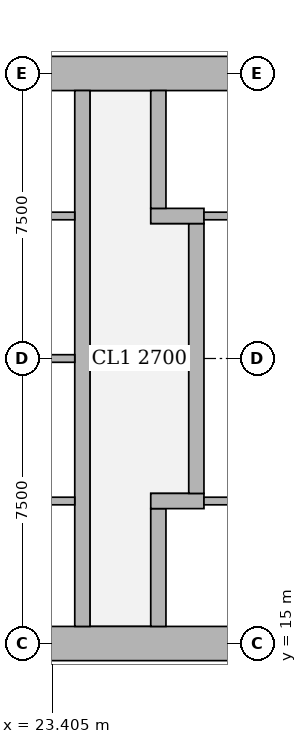
"""IFC4 building model, lengths in metres.
Left out: names, types, materials, properties, quantities, classifications, styles, units other than length and angle.
Written with IfcOpenShell. Run it as: python <this file> out.ifc"""

import sys

from ifc_helpers import new_model, si_unit, direction, frame, frame_2d, origin, place, context, subcontext, project, spatial, rectangle, extrude, element, fill, save


model = new_model("IFC4")
c1 = context("Model", 3, precision=1e-05, world=origin(), true_north=direction((0.0, 1.0)))
c2 = subcontext(c1, "Body", "Model", "MODEL_VIEW")
j1 = project(units=[si_unit("LENGTHUNIT", "METRE"), si_unit("PLANEANGLEUNIT", "RADIAN")], contexts=[c1])
p1 = place(None, origin())
s1 = spatial("IfcSite", under=j1, at=p1, CompositionType="ELEMENT")
p2 = place(p1, origin())
s2 = spatial("IfcBuilding", under=s1, at=p2, CompositionType="ELEMENT")
p3 = place(p2, frame((0.0, 0.0, 20.0)))
s3 = spatial("IfcBuildingStorey", under=s2, at=p3, CompositionType="ELEMENT", Elevation=20.0)
p4 = place(p3, frame((13.95, 15.0, 0.0), z_axis=(0.0, 0.0, 1.0), x_axis=(1.0, 0.0, 0.0)))
e1 = element("IfcWall", 1, at=p4, inside=s3, PredefinedType="SHEAR", context=c2, shape_type="SweptSolid", body=[
    extrude(rectangle(XDim=15.3, YDim=0.9, at=frame_2d((7.65, 0.0))), origin(), (0.0, 0.0, 1.0), 3.75),
])
p5 = place(p4, frame((4.45, 0.0, 0.0)))
e2 = element("IfcOpeningElement", 2, at=p5, cuts=e1, PredefinedType="OPENING", context=c2, shape_type="SweptSolid", body=[
    extrude(rectangle(XDim=1.8, YDim=2.1, at=frame_2d((0.9, 1.05))), frame((0.0, 0.46, 0.0), z_axis=(0.0, -1.0, 0.0), x_axis=(1.0, 0.0, 0.0)), (0.0, 0.0, 1.0), 0.92),
])
p6 = place(p4, frame((10.7, 0.0, 0.0)))
e3 = element("IfcOpeningElement", 3, at=p6, cuts=e1, PredefinedType="OPENING", context=c2, shape_type="SweptSolid", body=[
    extrude(rectangle(XDim=1.1, YDim=2.1, at=frame_2d((0.55, 1.05))), frame((0.0, 0.46, 0.0), z_axis=(0.0, -1.0, 0.0), x_axis=(1.0, 0.0, 0.0)), (0.0, 0.0, 1.0), 0.92),
])
p7 = place(p3, frame((13.95, 30.0, 0.0), z_axis=(0.0, 0.0, 1.0), x_axis=(1.0, 0.0, 0.0)))
e4 = element("IfcWall", 4, at=p7, inside=s3, PredefinedType="SHEAR", context=c2, shape_type="SweptSolid", body=[
    extrude(rectangle(XDim=15.3, YDim=0.9, at=frame_2d((7.65, 0.0))), origin(), (0.0, 0.0, 1.0), 3.75),
])
p8 = place(p7, frame((4.45, 0.0, 0.0)))
e5 = element("IfcOpeningElement", 5, at=p8, cuts=e4, PredefinedType="OPENING", context=c2, shape_type="SweptSolid", body=[
    extrude(rectangle(XDim=1.8, YDim=2.1, at=frame_2d((0.9, 1.05))), frame((0.0, 0.46, 0.0), z_axis=(0.0, -1.0, 0.0), x_axis=(1.0, 0.0, 0.0)), (0.0, 0.0, 1.0), 0.92),
])
p9 = place(p7, frame((10.7, 0.0, 0.0)))
e6 = element("IfcOpeningElement", 6, at=p9, cuts=e4, PredefinedType="OPENING", context=c2, shape_type="SweptSolid", body=[
    extrude(rectangle(XDim=1.1, YDim=2.1, at=frame_2d((0.55, 1.05))), frame((0.0, 0.46, 0.0), z_axis=(0.0, -1.0, 0.0), x_axis=(1.0, 0.0, 0.0)), (0.0, 0.0, 1.0), 0.92),
])
p10 = place(p3, frame((24.2, 15.45, 0.0), z_axis=(0.0, 0.0, 1.0), x_axis=(0.0, 1.0, 0.0)))
e7 = element("IfcWall", 7, at=p10, inside=s3, PredefinedType="SHEAR", context=c2, shape_type="SweptSolid", body=[
    extrude(rectangle(XDim=14.1, YDim=0.4, at=frame_2d((7.05, 0.0))), origin(), (0.0, 0.0, 1.0), 3.75),
])
p11 = place(p3, frame((26.2, 15.45, 0.0), z_axis=(0.0, 0.0, 1.0), x_axis=(0.0, 1.0, 0.0)))
e8 = element("IfcWall", 8, at=p11, inside=s3, PredefinedType="SHEAR", context=c2, shape_type="SweptSolid", body=[
    extrude(rectangle(XDim=3.1, YDim=0.4, at=frame_2d((1.55, 0.0))), origin(), (0.0, 0.0, 1.0), 3.75),
])
p12 = place(p11, frame((0.825, 0.0, 0.0)))
e9 = element("IfcOpeningElement", 9, at=p12, cuts=e8, PredefinedType="OPENING", context=c2, shape_type="SweptSolid", body=[
    extrude(rectangle(XDim=1.2, YDim=2.1, at=frame_2d((0.6, 1.05))), frame((0.0, 0.21, 0.0), z_axis=(0.0, -1.0, 0.0), x_axis=(1.0, 0.0, 0.0)), (0.0, 0.0, 1.0), 0.42),
])
p13 = place(p3, frame((26.0, 18.75, 0.0), z_axis=(0.0, 0.0, 1.0), x_axis=(1.0, 0.0, 0.0)))
e10 = element("IfcWall", 10, at=p13, inside=s3, PredefinedType="SHEAR", context=c2, shape_type="SweptSolid", body=[
    extrude(rectangle(XDim=1.4, YDim=0.4, at=frame_2d((0.7, 0.0))), origin(), (0.0, 0.0, 1.0), 3.75),
])
p14 = place(p3, frame((27.2, 18.95, 0.0), z_axis=(0.0, 0.0, 1.0), x_axis=(0.0, 1.0, 0.0)))
e11 = element("IfcWall", 11, at=p14, inside=s3, PredefinedType="SHEAR", context=c2, shape_type="SweptSolid", body=[
    extrude(rectangle(XDim=7.1, YDim=0.4, at=frame_2d((3.55, 0.0))), origin(), (0.0, 0.0, 1.0), 3.75),
])
p15 = place(p3, frame((26.0, 26.25, 0.0), z_axis=(0.0, 0.0, 1.0), x_axis=(1.0, 0.0, 0.0)))
e12 = element("IfcWall", 12, at=p15, inside=s3, PredefinedType="SHEAR", context=c2, shape_type="SweptSolid", body=[
    extrude(rectangle(XDim=1.4, YDim=0.4, at=frame_2d((0.7, 0.0))), origin(), (0.0, 0.0, 1.0), 3.75),
])
p16 = place(p3, frame((26.2, 26.45, 0.0), z_axis=(0.0, 0.0, 1.0), x_axis=(0.0, 1.0, 0.0)))
e13 = element("IfcWall", 13, at=p16, inside=s3, PredefinedType="SHEAR", context=c2, shape_type="SweptSolid", body=[
    extrude(rectangle(XDim=3.1, YDim=0.4, at=frame_2d((1.55, 0.0))), origin(), (0.0, 0.0, 1.0), 3.75),
])
p17 = place(p16, frame((1.075, 0.0, 0.0)))
e14 = element("IfcOpeningElement", 14, at=p17, cuts=e13, PredefinedType="OPENING", context=c2, shape_type="SweptSolid", body=[
    extrude(rectangle(XDim=1.2, YDim=2.1, at=frame_2d((0.6, 1.05))), frame((0.0, 0.21, 0.0), z_axis=(0.0, -1.0, 0.0), x_axis=(1.0, 0.0, 0.0)), (0.0, 0.0, 1.0), 0.42),
])
for number, where, z_axis, x_axis in (
    (15, (21.8, 18.75, 0.0), (0.0, 0.0, 1.0), (1.0, 0.0, 0.0)),
    (16, (21.8, 22.5, 0.0), (0.0, 0.0, 1.0), (1.0, 0.0, 0.0)),
    (17, (21.8, 26.25, 0.0), (0.0, 0.0, 1.0), (1.0, 0.0, 0.0)),
):
    element("IfcWall", number, at=place(p3, frame(where, z_axis=z_axis, x_axis=x_axis)), inside=s3, PredefinedType="SOLIDWALL", context=c2, shape_type="SweptSolid", body=[
        extrude(rectangle(XDim=2.2, YDim=0.2, at=frame_2d((1.1, 0.0))), origin(), (0.0, 0.0, 1.0), 3.5),
    ])
for number, where, z_axis, x_axis in (
    (18, (27.4, 18.75, 0.0), (0.0, 0.0, 1.0), (1.0, 0.0, 0.0)),
    (19, (27.4, 26.25, 0.0), (0.0, 0.0, 1.0), (1.0, 0.0, 0.0)),
):
    element("IfcWall", number, at=place(p3, frame(where, z_axis=z_axis, x_axis=x_axis)), inside=s3, PredefinedType="SOLIDWALL", context=c2, shape_type="SweptSolid", body=[
        extrude(rectangle(XDim=0.95, YDim=0.2, at=frame_2d((0.475, 0.0))), origin(), (0.0, 0.0, 1.0), 3.5),
    ])
p18 = place(p6, origin())
e20 = element("IfcDoor", 20, at=p18, inside=s3, OperationType="SINGLE_SWING_RIGHT", PredefinedType="DOOR", context=c2, shape_type="SweptSolid", body=[
    extrude(rectangle(XDim=1.1, YDim=2.1, at=frame_2d((0.55, 1.05))), frame((0.0, 0.025, 0.0), z_axis=(0.0, -1.0, 0.0), x_axis=(1.0, 0.0, 0.0)), (0.0, 0.0, 1.0), 0.05),
])
fill(e3, e20)
p19 = place(p9, origin())
e21 = element("IfcDoor", 21, at=p19, inside=s3, OperationType="SINGLE_SWING_RIGHT", PredefinedType="DOOR", context=c2, shape_type="SweptSolid", body=[
    extrude(rectangle(XDim=1.1, YDim=2.1, at=frame_2d((0.55, 1.05))), frame((0.0, 0.025, 0.0), z_axis=(0.0, -1.0, 0.0), x_axis=(1.0, 0.0, 0.0)), (0.0, 0.0, 1.0), 0.05),
])
fill(e6, e21)
p20 = place(p12, origin())
e22 = element("IfcDoor", 22, at=p20, inside=s3, OperationType="DOUBLE_DOOR_SLIDING", PredefinedType="DOOR", context=c2, shape_type="SweptSolid", body=[
    extrude(rectangle(XDim=1.2, YDim=2.1, at=frame_2d((0.6, 1.05))), frame((0.0, 0.025, 0.0), z_axis=(0.0, -1.0, 0.0), x_axis=(1.0, 0.0, 0.0)), (0.0, 0.0, 1.0), 0.05),
])
fill(e9, e22)
p21 = place(p17, origin())
e23 = element("IfcDoor", 23, at=p21, inside=s3, OperationType="DOUBLE_DOOR_SLIDING", PredefinedType="DOOR", context=c2, shape_type="SweptSolid", body=[
    extrude(rectangle(XDim=1.2, YDim=2.1, at=frame_2d((0.6, 1.05))), frame((0.0, 0.025, 0.0), z_axis=(0.0, -1.0, 0.0), x_axis=(1.0, 0.0, 0.0)), (0.0, 0.0, 1.0), 0.05),
])
fill(e14, e23)
save(model, sys.argv[1])
